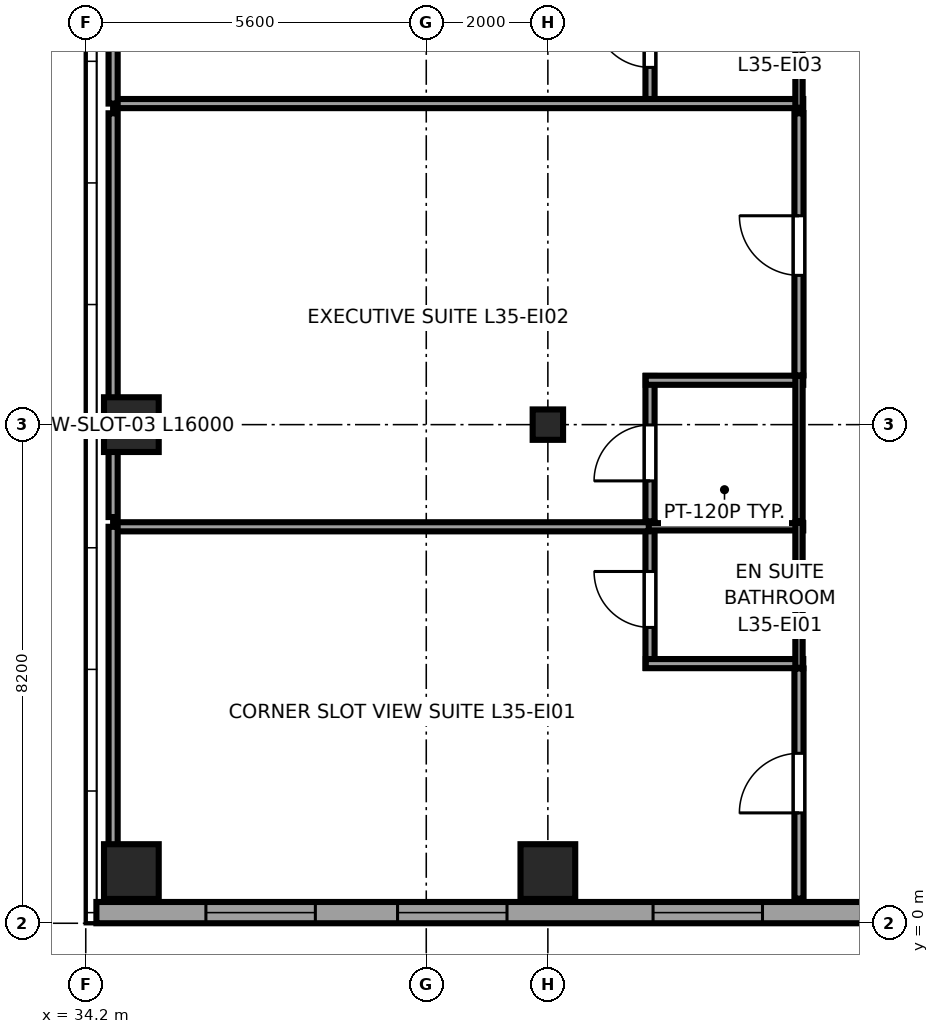
"""IFC4 building model, lengths in metres.
Left out: names, types, materials, properties, quantities, classifications, styles, units other than length and angle.
Written with IfcOpenShell. Run it as: python <this file> out.ifc"""

import sys

from ifc_helpers import new_model, si_unit, direction, frame, frame_2d, origin, origin_2d, place, context, subcontext, project, spatial, rectangle, i_section, extrude, source, transform, mapped, element, fill, save


model = new_model("IFC4")
c1 = context("Model", 3, precision=1e-05, world=origin(), true_north=direction((0.0, 1.0)))
c2 = subcontext(c1, "Body", "Model", "MODEL_VIEW")
j1 = project(units=[si_unit("LENGTHUNIT", "METRE"), si_unit("PLANEANGLEUNIT", "RADIAN")], contexts=[c1])
p1 = place(None, origin())
s1 = spatial("IfcSite", under=j1, at=p1, CompositionType="ELEMENT")
p2 = place(p1, origin())
s2 = spatial("IfcBuilding", under=s1, at=p2, CompositionType="ELEMENT")
p3 = place(p2, frame((0.0, 0.0, 136.4)))
s3 = spatial("IfcBuildingStorey", under=s2, at=p3, CompositionType="ELEMENT", Elevation=136.4)
m1 = source(origin(), c2, "Body", "SweptSolid", [
    extrude(rectangle(XDim=0.9, YDim=0.9, at=origin_2d()), origin(), (0.0, 0.0, 1.0), 3.55),
])
for number, where, z_axis, x_axis in (
    (1, (34.95, 0.85, 0.0), (0.0, 0.0, 1.0), (1.0, 0.0, 0.0)),
    (2, (34.95, 8.2, 0.0), (0.0, 0.0, 1.0), (1.0, 0.0, 0.0)),
    (3, (41.8, 0.85, 0.0), (0.0, 0.0, 1.0), (1.0, 0.0, 0.0)),
):
    element("IfcColumn", number, at=place(p3, frame(where, z_axis=z_axis, x_axis=x_axis)), inside=s3, PredefinedType="COLUMN", context=c2, shape_type="MappedRepresentation", body=[
        mapped(m1, transform((0.0, 0.0, 0.0), x_axis=(1.0, 0.0, 0.0), y_axis=(0.0, 1.0, 0.0), z_axis=(0.0, 0.0, 1.0), scale=1.0)),
    ])
m2 = source(origin(), c2, "Body", "SweptSolid", [
    extrude(i_section(OverallWidth=0.5, OverallDepth=0.5, WebThickness=0.022, FlangeThickness=0.034, at=origin_2d()), origin(), (0.0, 0.0, 1.0), 3.55),
])
p4 = place(p3, frame((41.8, 8.2, 0.0), z_axis=(0.0, 0.0, 1.0), x_axis=(1.0, 0.0, 0.0)))
e4 = element("IfcColumn", 4, at=p4, inside=s3, PredefinedType="COLUMN", context=c2, shape_type="MappedRepresentation", body=[
    mapped(m2, transform((0.0, 0.0, 0.0), x_axis=(1.0, 0.0, 0.0), y_axis=(0.0, 1.0, 0.0), z_axis=(0.0, 0.0, 1.0), scale=1.0)),
])
p5 = place(p3, frame((34.375, 0.175, 0.0), z_axis=(0.0, 0.0, 1.0), x_axis=(1.0, 0.0, 0.0)))
e5 = element("IfcWall", 5, at=p5, inside=s3, PredefinedType="SOLIDWALL", context=c2, shape_type="SweptSolid", body=[
    extrude(rectangle(XDim=18.008, YDim=0.35, at=frame_2d((9.004, 0.0))), origin(), (0.0, 0.0, 1.0), 3.37),
])
p6 = place(p5, frame((1.801, 0.0, 0.68)))
e6 = element("IfcOpeningElement", 6, at=p6, cuts=e5, PredefinedType="OPENING", context=c2, shape_type="SweptSolid", body=[
    extrude(rectangle(XDim=1.8, YDim=1.85, at=frame_2d((0.9, 0.925))), frame((0.0, 0.185, 0.0), z_axis=(0.0, -1.0, 0.0), x_axis=(1.0, 0.0, 0.0)), (0.0, 0.0, 1.0), 0.37),
])
p7 = place(p5, frame((4.953, 0.0, 0.68)))
e7 = element("IfcOpeningElement", 7, at=p7, cuts=e5, PredefinedType="OPENING", context=c2, shape_type="SweptSolid", body=[
    extrude(rectangle(XDim=1.8, YDim=1.85, at=frame_2d((0.9, 0.925))), frame((0.0, 0.185, 0.0), z_axis=(0.0, -1.0, 0.0), x_axis=(1.0, 0.0, 0.0)), (0.0, 0.0, 1.0), 0.37),
])
p8 = place(p5, frame((9.155, 0.0, 0.68)))
e8 = element("IfcOpeningElement", 8, at=p8, cuts=e5, PredefinedType="OPENING", context=c2, shape_type="SweptSolid", body=[
    extrude(rectangle(XDim=1.8, YDim=1.85, at=frame_2d((0.9, 0.925))), frame((0.0, 0.185, 0.0), z_axis=(0.0, -1.0, 0.0), x_axis=(1.0, 0.0, 0.0)), (0.0, 0.0, 1.0), 0.37),
])
p9 = place(p5, frame((14.991, 0.0, 0.62)))
e9 = element("IfcOpeningElement", 9, at=p9, cuts=e5, PredefinedType="OPENING", context=c2, shape_type="SweptSolid", body=[
    extrude(rectangle(XDim=1.5, YDim=1.55, at=frame_2d((0.75, 0.775))), frame((0.0, 0.185, 0.0), z_axis=(0.0, -1.0, 0.0), x_axis=(1.0, 0.0, 0.0)), (0.0, 0.0, 1.0), 0.37),
])
p10 = place(p3, frame((43.48, 4.2, 0.0), z_axis=(0.0, 0.0, 1.0), x_axis=(0.0, 1.0, 0.0)))
e10 = element("IfcWall", 10, at=p10, inside=s3, PredefinedType="PARTITIONING", context=c2, shape_type="SweptSolid", body=[
    extrude(rectangle(XDim=2.39, YDim=0.15, at=frame_2d((1.195, 0.0))), origin(), (0.0, 0.0, 1.0), 3.37),
])
p11 = place(p10, frame((0.665, 0.0, 0.0)))
e11 = element("IfcOpeningElement", 11, at=p11, cuts=e10, PredefinedType="OPENING", context=c2, shape_type="SweptSolid", body=[
    extrude(rectangle(XDim=0.92, YDim=2.01, at=frame_2d((0.46, 1.005))), frame((0.0, 0.085, 0.0), z_axis=(0.0, -1.0, 0.0), x_axis=(1.0, 0.0, 0.0)), (0.0, 0.0, 1.0), 0.17),
])
p12 = place(p3, frame((43.41, 4.27, 0.0), z_axis=(0.0, 0.0, 1.0), x_axis=(1.0, 0.0, 0.0)))
e12 = element("IfcWall", 12, at=p12, inside=s3, PredefinedType="PARTITIONING", context=c2, shape_type="SweptSolid", body=[
    extrude(rectangle(XDim=2.59, YDim=0.15, at=frame_2d((1.295, 0.0))), origin(), (0.0, 0.0, 1.0), 3.37),
])
p13 = place(p3, frame((43.41, 6.52, 0.0), z_axis=(0.0, 0.0, 1.0), x_axis=(1.0, 0.0, 0.0)))
e13 = element("IfcWall", 13, at=p13, inside=s3, PredefinedType="PLUMBINGWALL", context=c2, shape_type="SweptSolid", body=[
    extrude(rectangle(XDim=2.59, YDim=0.12, at=frame_2d((1.295, 0.0))), origin(), (0.0, 0.0, 1.0), 3.37),
])
p14 = place(p3, frame((45.93, 4.2, 0.0), z_axis=(0.0, 0.0, 1.0), x_axis=(0.0, 1.0, 0.0)))
e14 = element("IfcWall", 14, at=p14, inside=s3, PredefinedType="PLUMBINGWALL", context=c2, shape_type="SweptSolid", body=[
    extrude(rectangle(XDim=2.39, YDim=0.12, at=frame_2d((1.195, 0.0))), origin(), (0.0, 0.0, 1.0), 3.37),
])
p15 = place(p3, frame((43.48, 6.61, 0.0), z_axis=(0.0, 0.0, 1.0), x_axis=(0.0, 1.0, 0.0)))
e15 = element("IfcWall", 15, at=p15, inside=s3, PredefinedType="PARTITIONING", context=c2, shape_type="SweptSolid", body=[
    extrude(rectangle(XDim=2.39, YDim=0.15, at=frame_2d((1.195, 0.0))), origin(), (0.0, 0.0, 1.0), 3.37),
])
p16 = place(p15, frame((0.665, 0.0, 0.0)))
e16 = element("IfcOpeningElement", 16, at=p16, cuts=e15, PredefinedType="OPENING", context=c2, shape_type="SweptSolid", body=[
    extrude(rectangle(XDim=0.92, YDim=2.01, at=frame_2d((0.46, 1.005))), frame((0.0, 0.085, 0.0), z_axis=(0.0, -1.0, 0.0), x_axis=(1.0, 0.0, 0.0)), (0.0, 0.0, 1.0), 0.17),
])
p17 = place(p3, frame((43.41, 8.93, 0.0), z_axis=(0.0, 0.0, 1.0), x_axis=(1.0, 0.0, 0.0)))
e17 = element("IfcWall", 17, at=p17, inside=s3, PredefinedType="PARTITIONING", context=c2, shape_type="SweptSolid", body=[
    extrude(rectangle(XDim=2.59, YDim=0.15, at=frame_2d((1.295, 0.0))), origin(), (0.0, 0.0, 1.0), 3.37),
])
p18 = place(p3, frame((45.93, 6.61, 0.0), z_axis=(0.0, 0.0, 1.0), x_axis=(0.0, 1.0, 0.0)))
e18 = element("IfcWall", 18, at=p18, inside=s3, PredefinedType="PLUMBINGWALL", context=c2, shape_type="SweptSolid", body=[
    extrude(rectangle(XDim=2.39, YDim=0.12, at=frame_2d((1.195, 0.0))), origin(), (0.0, 0.0, 1.0), 3.37),
])
p19 = place(p3, frame((43.48, 13.41, 0.0), z_axis=(0.0, 0.0, 1.0), x_axis=(0.0, 1.0, 0.0)))
e19 = element("IfcWall", 19, at=p19, inside=s3, PredefinedType="PARTITIONING", context=c2, shape_type="SweptSolid", body=[
    extrude(rectangle(XDim=2.39, YDim=0.15, at=frame_2d((1.195, 0.0))), origin(), (0.0, 0.0, 1.0), 3.37),
])
p20 = place(p19, frame((0.665, 0.0, 0.0)))
e20 = element("IfcOpeningElement", 20, at=p20, cuts=e19, PredefinedType="OPENING", context=c2, shape_type="SweptSolid", body=[
    extrude(rectangle(XDim=0.92, YDim=2.01, at=frame_2d((0.46, 1.005))), frame((0.0, 0.085, 0.0), z_axis=(0.0, -1.0, 0.0), x_axis=(1.0, 0.0, 0.0)), (0.0, 0.0, 1.0), 0.17),
])
p21 = place(p3, frame((34.65, 13.48, 0.0), z_axis=(0.0, 0.0, 1.0), x_axis=(1.0, 0.0, 0.0)))
e21 = element("IfcWall", 21, at=p21, inside=s3, PredefinedType="PARTITIONING", context=c2, shape_type="SweptSolid", body=[
    extrude(rectangle(XDim=11.35, YDim=0.15, at=frame_2d((5.675, 0.0))), origin(), (0.0, 0.0, 1.0), 3.37),
])
p22 = place(p3, frame((45.93, 13.41, 0.0), z_axis=(0.0, 0.0, 1.0), x_axis=(0.0, 1.0, 0.0)))
e22 = element("IfcWall", 22, at=p22, inside=s3, PredefinedType="PLUMBINGWALL", context=c2, shape_type="SweptSolid", body=[
    extrude(rectangle(XDim=2.39, YDim=0.12, at=frame_2d((1.195, 0.0))), origin(), (0.0, 0.0, 1.0), 3.37),
])
p23 = place(p3, frame((45.93, 0.405, 0.0), z_axis=(0.0, 0.0, 1.0), x_axis=(0.0, 1.0, 0.0)))
e23 = element("IfcWall", 23, at=p23, inside=s3, PredefinedType="PARTITIONING", context=c2, shape_type="SweptSolid", body=[
    extrude(rectangle(XDim=3.785, YDim=0.15, at=frame_2d((1.893, 0.0))), origin(), (0.0, 0.0, 1.0), 3.37),
])
p24 = place(p23, frame((1.41, 0.0, 0.0)))
e24 = element("IfcOpeningElement", 24, at=p24, cuts=e23, PredefinedType="OPENING", context=c2, shape_type="SweptSolid", body=[
    extrude(rectangle(XDim=0.98, YDim=2.12, at=frame_2d((0.49, 1.06))), frame((0.0, 0.085, 0.0), z_axis=(0.0, -1.0, 0.0), x_axis=(1.0, 0.0, 0.0)), (0.0, 0.0, 1.0), 0.17),
])
p25 = place(p3, frame((34.65, 6.52, 0.0), z_axis=(0.0, 0.0, 1.0), x_axis=(1.0, 0.0, 0.0)))
e25 = element("IfcWall", 25, at=p25, inside=s3, PredefinedType="PARTITIONING", context=c2, shape_type="SweptSolid", body=[
    extrude(rectangle(XDim=8.81, YDim=0.15, at=frame_2d((4.405, 0.0))), origin(), (0.0, 0.0, 1.0), 3.37),
])
p26 = place(p3, frame((34.65, 0.405, 0.0), z_axis=(0.0, 0.0, 1.0), x_axis=(0.0, 1.0, 0.0)))
e26 = element("IfcWall", 26, at=p26, inside=s3, PredefinedType="PARTITIONING", context=c2, shape_type="SweptSolid", body=[
    extrude(rectangle(XDim=6.115, YDim=0.15, at=frame_2d((3.058, 0.0))), origin(), (0.0, 0.0, 1.0), 3.37),
])
p27 = place(p3, frame((45.93, 9.01, 0.0), z_axis=(0.0, 0.0, 1.0), x_axis=(0.0, 1.0, 0.0)))
e27 = element("IfcWall", 27, at=p27, inside=s3, PredefinedType="PARTITIONING", context=c2, shape_type="SweptSolid", body=[
    extrude(rectangle(XDim=4.31, YDim=0.15, at=frame_2d((2.155, 0.0))), origin(), (0.0, 0.0, 1.0), 3.37),
])
p28 = place(p27, frame((1.645, 0.0, 0.0)))
e28 = element("IfcOpeningElement", 28, at=p28, cuts=e27, PredefinedType="OPENING", context=c2, shape_type="SweptSolid", body=[
    extrude(rectangle(XDim=0.98, YDim=2.12, at=frame_2d((0.49, 1.06))), frame((0.0, 0.085, 0.0), z_axis=(0.0, -1.0, 0.0), x_axis=(1.0, 0.0, 0.0)), (0.0, 0.0, 1.0), 0.17),
])
p29 = place(p3, frame((34.65, 6.68, 0.0), z_axis=(0.0, 0.0, 1.0), x_axis=(0.0, 1.0, 0.0)))
e29 = element("IfcWall", 29, at=p29, inside=s3, PredefinedType="PARTITIONING", context=c2, shape_type="SweptSolid", body=[
    extrude(rectangle(XDim=6.64, YDim=0.15, at=frame_2d((3.32, 0.0))), origin(), (0.0, 0.0, 1.0), 3.37),
])
p30 = place(p3, frame((34.65, 13.48, 0.0), z_axis=(0.0, 0.0, 1.0), x_axis=(0.0, 1.0, 0.0)))
e30 = element("IfcWall", 30, at=p30, inside=s3, PredefinedType="PARTITIONING", context=c2, shape_type="SweptSolid", body=[
    extrude(rectangle(XDim=6.54, YDim=0.15, at=frame_2d((3.27, 0.0))), origin(), (0.0, 0.0, 1.0), 3.37),
])
m3 = source(origin(), c2, "Body", "SweptSolid", [
    extrude(rectangle(XDim=1.8, YDim=1.85, at=frame_2d((0.9, 0.925))), frame((0.0, 0.09, 0.0), z_axis=(0.0, -1.0, 0.0), x_axis=(1.0, 0.0, 0.0)), (0.0, 0.0, 1.0), 0.06),
])
p31 = place(p6, origin())
e31 = element("IfcWindow", 31, at=p31, inside=s3, PartitioningType="TRIPLE_PANEL_HORIZONTAL", PredefinedType="WINDOW", context=c2, shape_type="MappedRepresentation", body=[
    mapped(m3, transform((0.0, 0.0, 0.0), x_axis=(1.0, 0.0, 0.0), y_axis=(0.0, 1.0, 0.0), z_axis=(0.0, 0.0, 1.0), scale=1.0)),
])
fill(e6, e31)
p32 = place(p7, origin())
e32 = element("IfcWindow", 32, at=p32, inside=s3, PartitioningType="TRIPLE_PANEL_HORIZONTAL", PredefinedType="WINDOW", context=c2, shape_type="MappedRepresentation", body=[
    mapped(m3, transform((0.0, 0.0, 0.0), x_axis=(1.0, 0.0, 0.0), y_axis=(0.0, 1.0, 0.0), z_axis=(0.0, 0.0, 1.0), scale=1.0)),
])
fill(e7, e32)
p33 = place(p8, origin())
e33 = element("IfcWindow", 33, at=p33, inside=s3, PartitioningType="TRIPLE_PANEL_HORIZONTAL", PredefinedType="WINDOW", context=c2, shape_type="MappedRepresentation", body=[
    mapped(m3, transform((0.0, 0.0, 0.0), x_axis=(1.0, 0.0, 0.0), y_axis=(0.0, 1.0, 0.0), z_axis=(0.0, 0.0, 1.0), scale=1.0)),
])
fill(e8, e33)
m4 = source(origin(), c2, "Body", "SweptSolid", [
    extrude(rectangle(XDim=0.92, YDim=2.01, at=frame_2d((0.46, 1.005))), frame((0.0, 0.025, 0.0), z_axis=(0.0, -1.0, 0.0), x_axis=(1.0, 0.0, 0.0)), (0.0, 0.0, 1.0), 0.05),
])
p34 = place(p11, origin())
e34 = element("IfcDoor", 34, at=p34, inside=s3, OperationType="SINGLE_SWING_RIGHT", PredefinedType="DOOR", context=c2, shape_type="MappedRepresentation", body=[
    mapped(m4, transform((0.0, 0.0, 0.0), x_axis=(1.0, 0.0, 0.0), y_axis=(0.0, 1.0, 0.0), z_axis=(0.0, 0.0, 1.0), scale=1.0)),
])
fill(e11, e34)
p35 = place(p16, origin())
e35 = element("IfcDoor", 35, at=p35, inside=s3, OperationType="SINGLE_SWING_LEFT", PredefinedType="DOOR", context=c2, shape_type="MappedRepresentation", body=[
    mapped(m4, transform((0.0, 0.0, 0.0), x_axis=(1.0, 0.0, 0.0), y_axis=(0.0, 1.0, 0.0), z_axis=(0.0, 0.0, 1.0), scale=1.0)),
])
fill(e16, e35)
p36 = place(p20, origin())
e36 = element("IfcDoor", 36, at=p36, inside=s3, OperationType="SINGLE_SWING_RIGHT", PredefinedType="DOOR", context=c2, shape_type="MappedRepresentation", body=[
    mapped(m4, transform((0.0, 0.0, 0.0), x_axis=(1.0, 0.0, 0.0), y_axis=(0.0, 1.0, 0.0), z_axis=(0.0, 0.0, 1.0), scale=1.0)),
])
fill(e20, e36)
m5 = source(origin(), c2, "Body", "SweptSolid", [
    extrude(rectangle(XDim=0.98, YDim=2.12, at=frame_2d((0.49, 1.06))), frame((0.0, 0.025, 0.0), z_axis=(0.0, -1.0, 0.0), x_axis=(1.0, 0.0, 0.0)), (0.0, 0.0, 1.0), 0.05),
])
p37 = place(p24, origin())
e37 = element("IfcDoor", 37, at=p37, inside=s3, OperationType="SINGLE_SWING_LEFT", PredefinedType="DOOR", context=c2, shape_type="MappedRepresentation", body=[
    mapped(m5, transform((0.0, 0.0, 0.0), x_axis=(1.0, 0.0, 0.0), y_axis=(0.0, 1.0, 0.0), z_axis=(0.0, 0.0, 1.0), scale=1.0)),
])
fill(e24, e37)
p38 = place(p28, origin())
e38 = element("IfcDoor", 38, at=p38, inside=s3, OperationType="SINGLE_SWING_RIGHT", PredefinedType="DOOR", context=c2, shape_type="MappedRepresentation", body=[
    mapped(m5, transform((0.0, 0.0, 0.0), x_axis=(1.0, 0.0, 0.0), y_axis=(0.0, 1.0, 0.0), z_axis=(0.0, 0.0, 1.0), scale=1.0)),
])
fill(e28, e38)
save(model, sys.argv[1])
